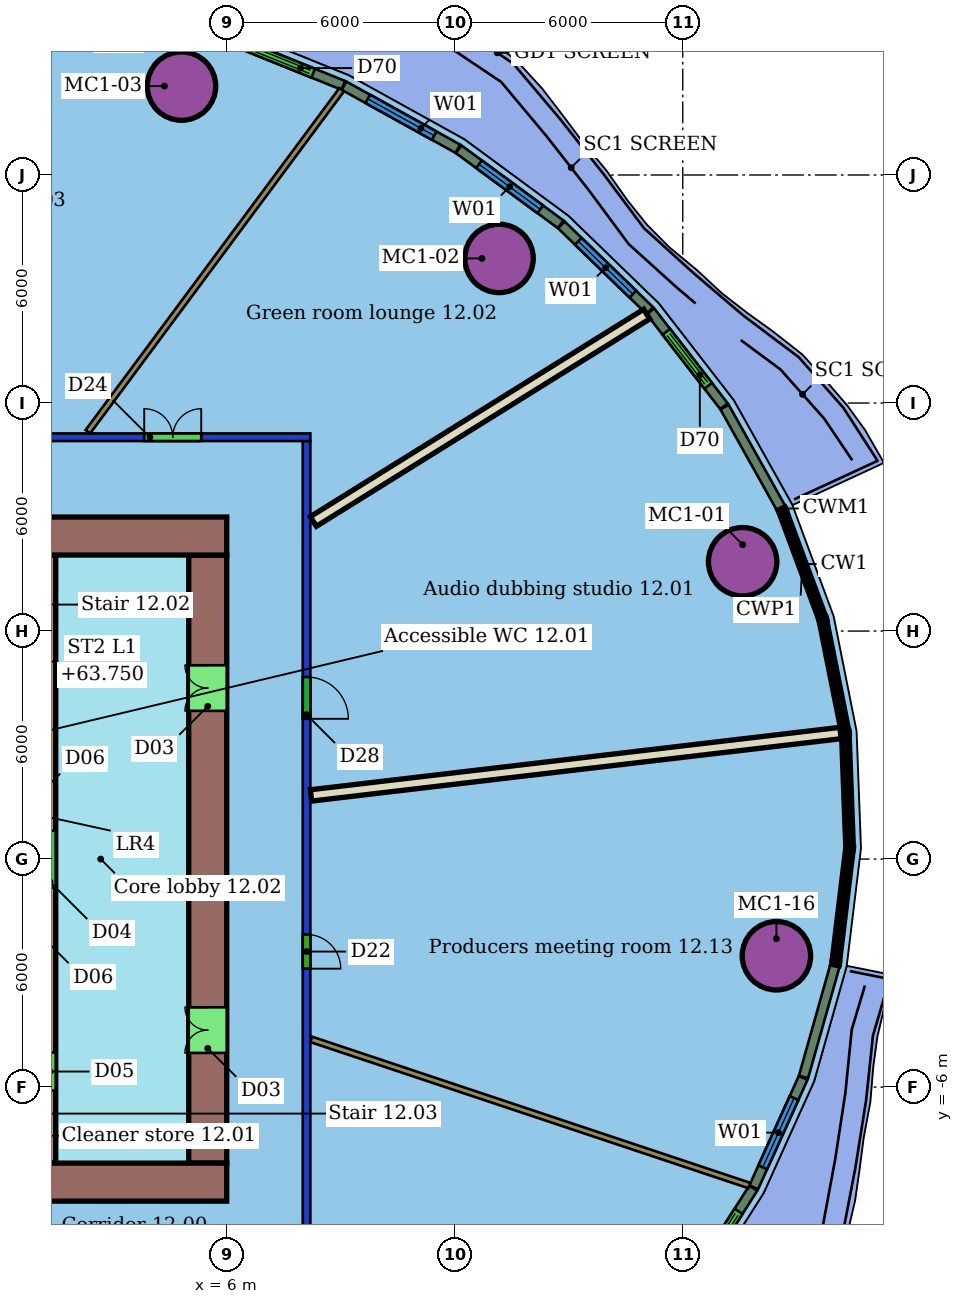
"""IFC4 building model, lengths in metres.
Left out: names, types, materials, properties, quantities, classifications, styles, units other than length and angle.
Written with IfcOpenShell. Run it as: python <this file> out.ifc"""

import sys

from ifc_helpers import new_model, si_unit, direction, frame, frame_2d, origin, origin_2d, place, context, subcontext, project, spatial, rectangle, hollow_circle, extrude, element, fill, save


model = new_model("IFC4")
c1 = context("Model", 3, precision=1e-05, world=origin(), true_north=direction((0.0, 1.0)))
c2 = subcontext(c1, "Body", "Model", "MODEL_VIEW")
j1 = project(units=[si_unit("LENGTHUNIT", "METRE"), si_unit("PLANEANGLEUNIT", "RADIAN")], contexts=[c1])
p1 = place(None, origin())
s1 = spatial("IfcSite", under=j1, at=p1, CompositionType="ELEMENT")
p2 = place(p1, origin())
s2 = spatial("IfcBuilding", under=s1, at=p2, CompositionType="ELEMENT")
p3 = place(p2, frame((0.0, 0.0, 61.9)))
s3 = spatial("IfcBuildingStorey", under=s2, at=p3, CompositionType="ELEMENT", Elevation=61.9)
for number, where, z_axis, x_axis in (
    (1, (19.575, 7.824, 0.0), (0.0, 0.0, 1.0), (1.0, 0.0, 0.0)),
    (2, (13.166, 15.805, 0.0), (0.0, 0.0, 1.0), (1.0, 0.0, 0.0)),
    (3, (4.81, 20.339, 0.0), (0.0, 0.0, 1.0), (1.0, 0.0, 0.0)),
    (4, (20.464, -2.543, 0.0), (0.0, 0.0, 1.0), (1.0, 0.0, 0.0)),
):
    element("IfcColumn", number, at=place(p3, frame(where, z_axis=z_axis, x_axis=x_axis)), inside=s3, PredefinedType="COLUMN", context=c2, shape_type="SweptSolid", body=[
        extrude(hollow_circle(Radius=0.9, WallThickness=0.06, at=origin_2d()), origin(), (0.0, 0.0, 1.0), 3.55),
    ])
p4 = place(p3, frame((-20.2, 11.1, 0.0), z_axis=(0.0, 0.0, 1.0), x_axis=(1.0, 0.0, 0.0)))
e5 = element("IfcWall", 5, at=p4, inside=s3, PredefinedType="PARTITIONING", context=c2, shape_type="SweptSolid", body=[
    extrude(rectangle(XDim=28.4, YDim=0.2, at=frame_2d((14.2, 0.0))), origin(), (0.0, 0.0, 1.0), 2.85),
])
p5 = place(p4, frame((24.029, 0.0, 0.0)))
e6 = element("IfcOpeningElement", 6, at=p5, cuts=e5, PredefinedType="OPENING", context=c2, shape_type="SweptSolid", body=[
    extrude(rectangle(XDim=1.5, YDim=2.1, at=frame_2d((0.75, 1.05))), frame((0.0, 0.11, 0.0), z_axis=(0.0, -1.0, 0.0), x_axis=(1.0, 0.0, 0.0)), (0.0, 0.0, 1.0), 0.22),
])
p6 = place(p4, frame((18.723, 0.0, 0.0)))
e7 = element("IfcOpeningElement", 7, at=p6, cuts=e5, PredefinedType="OPENING", context=c2, shape_type="SweptSolid", body=[
    extrude(rectangle(XDim=1.0, YDim=2.1, at=frame_2d((0.5, 1.05))), frame((0.0, 0.11, 0.0), z_axis=(0.0, -1.0, 0.0), x_axis=(1.0, 0.0, 0.0)), (0.0, 0.0, 1.0), 0.22),
])
p7 = place(p4, frame((10.0, 0.0, 0.0)))
e8 = element("IfcOpeningElement", 8, at=p7, cuts=e5, PredefinedType="OPENING", context=c2, shape_type="SweptSolid", body=[
    extrude(rectangle(XDim=1.2, YDim=2.1, at=frame_2d((0.6, 1.05))), frame((0.0, 0.11, 0.0), z_axis=(0.0, -1.0, 0.0), x_axis=(1.0, 0.0, 0.0)), (0.0, 0.0, 1.0), 0.22),
])
p8 = place(p4, frame((5.648, 0.0, 0.0)))
e9 = element("IfcOpeningElement", 9, at=p8, cuts=e5, PredefinedType="OPENING", context=c2, shape_type="SweptSolid", body=[
    extrude(rectangle(XDim=1.0, YDim=2.1, at=frame_2d((0.5, 1.05))), frame((0.0, 0.11, 0.0), z_axis=(0.0, -1.0, 0.0), x_axis=(1.0, 0.0, 0.0)), (0.0, 0.0, 1.0), 0.22),
])
p9 = place(p3, frame((8.1, 11.0, 0.0), z_axis=(0.0, 0.0, 1.0), x_axis=(0.0, -1.0, 0.0)))
e10 = element("IfcWall", 10, at=p9, inside=s3, PredefinedType="PARTITIONING", context=c2, shape_type="SweptSolid", body=[
    extrude(rectangle(XDim=22.0, YDim=0.2, at=frame_2d((11.0, 0.0))), origin(), (0.0, 0.0, 1.0), 2.85),
])
p10 = place(p9, frame((6.209, 0.0, 0.0)))
e11 = element("IfcOpeningElement", 11, at=p10, cuts=e10, PredefinedType="OPENING", context=c2, shape_type="SweptSolid", body=[
    extrude(rectangle(XDim=1.1, YDim=2.1, at=frame_2d((0.55, 1.05))), frame((0.0, 0.11, 0.0), z_axis=(0.0, -1.0, 0.0), x_axis=(1.0, 0.0, 0.0)), (0.0, 0.0, 1.0), 0.22),
])
p11 = place(p9, frame((12.983, 0.0, 0.0)))
e12 = element("IfcOpeningElement", 12, at=p11, cuts=e10, PredefinedType="OPENING", context=c2, shape_type="SweptSolid", body=[
    extrude(rectangle(XDim=0.9, YDim=2.1, at=frame_2d((0.45, 1.05))), frame((0.0, 0.11, 0.0), z_axis=(0.0, -1.0, 0.0), x_axis=(1.0, 0.0, 0.0)), (0.0, 0.0, 1.0), 0.22),
])
p12 = place(p3, frame((22.152, 3.317, 0.0), z_axis=(0.0, 0.0, 1.0), x_axis=(-0.993129803106, -0.117017922486, 0.0)))
e13 = element("IfcWall", 13, at=p12, inside=s3, PredefinedType="PARTITIONING", context=c2, shape_type="SweptSolid", body=[
    extrude(rectangle(XDim=14.031, YDim=0.3, at=frame_2d((7.015, 0.0))), origin(), (0.0, 0.0, 1.0), 3.55),
])
p13 = place(p3, frame((17.05, 14.339, 0.0), z_axis=(0.0, 0.0, 1.0), x_axis=(-0.849102541968, -0.528228050395, 0.0)))
e14 = element("IfcWall", 14, at=p13, inside=s3, PredefinedType="PARTITIONING", context=c2, shape_type="SweptSolid", body=[
    extrude(rectangle(XDim=10.329, YDim=0.3, at=frame_2d((5.165, 0.0))), origin(), (0.0, 0.0, 1.0), 3.55),
])
p14 = place(p3, frame((9.023, 20.242, 0.0), z_axis=(0.0, 0.0, 1.0), x_axis=(-0.595979742746, -0.802999468391, 0.0)))
e15 = element("IfcWall", 15, at=p14, inside=s3, PredefinedType="PARTITIONING", context=c2, shape_type="SweptSolid", body=[
    extrude(rectangle(XDim=11.205, YDim=0.15, at=frame_2d((5.602, 0.0))), origin(), (0.0, 0.0, 1.0), 3.55),
])
p15 = place(p3, frame((19.752, -8.589, 0.0), z_axis=(0.0, 0.0, 1.0), x_axis=(-0.948621001224, 0.316414595169, 0.0)))
e16 = element("IfcWall", 16, at=p15, inside=s3, PredefinedType="PARTITIONING", context=c2, shape_type="SweptSolid", body=[
    extrude(rectangle(XDim=12.152, YDim=0.15, at=frame_2d((6.076, 0.0))), origin(), (0.0, 0.0, 1.0), 3.55),
])
p16 = place(p3, frame((20.587, 9.234, 0.0), z_axis=(0.0, 0.0, 1.0), x_axis=(-0.488205617754, 0.872728637547, 0.0)))
e17 = element("IfcWall", 17, at=p16, inside=s3, PredefinedType="SOLIDWALL", context=c2, shape_type="SweptSolid", body=[
    extrude(rectangle(XDim=3.047, YDim=0.25, at=frame_2d((1.523, 0.0))), origin(), (0.0, 0.0, 1.0), 3.15),
])
p17 = place(p3, frame((19.085, 11.916, 0.0), z_axis=(0.0, 0.0, 1.0), x_axis=(-0.612382091745, 0.790561935404, 0.0)))
e18 = element("IfcWall", 18, at=p17, inside=s3, PredefinedType="SOLIDWALL", context=c2, shape_type="SweptSolid", body=[
    extrude(rectangle(XDim=3.158, YDim=0.25, at=frame_2d((1.579, 0.0))), origin(), (0.0, 0.0, 1.0), 3.15),
])
p18 = place(p17, frame((0.679, 0.0, 0.0)))
e19 = element("IfcOpeningElement", 19, at=p18, cuts=e18, PredefinedType="OPENING", context=c2, shape_type="SweptSolid", body=[
    extrude(rectangle(XDim=1.8, YDim=2.4, at=frame_2d((0.9, 1.2))), frame((0.0, 0.135, 0.0), z_axis=(0.0, -1.0, 0.0), x_axis=(1.0, 0.0, 0.0)), (0.0, 0.0, 1.0), 0.27),
])
p19 = place(p3, frame((17.134, 14.432, 0.0), z_axis=(0.0, 0.0, 1.0), x_axis=(-0.718313139299, 0.695719939279, 0.0)))
e20 = element("IfcWall", 20, at=p19, inside=s3, PredefinedType="SOLIDWALL", context=c2, shape_type="SweptSolid", body=[
    extrude(rectangle(XDim=3.242, YDim=0.25, at=frame_2d((1.621, 0.0))), origin(), (0.0, 0.0, 1.0), 3.15),
])
p20 = place(p19, frame((0.621, 0.0, 0.8)))
e21 = element("IfcOpeningElement", 21, at=p20, cuts=e20, PredefinedType="OPENING", context=c2, shape_type="SweptSolid", body=[
    extrude(rectangle(XDim=2.0, YDim=2.2, at=frame_2d((1.0, 1.1))), frame((0.0, 0.135, 0.0), z_axis=(0.0, -1.0, 0.0), x_axis=(1.0, 0.0, 0.0)), (0.0, 0.0, 1.0), 0.27),
])
p21 = place(p3, frame((14.786, 16.703, 0.0), z_axis=(0.0, 0.0, 1.0), x_axis=(-0.80553067299, 0.592554077594, 0.0)))
e22 = element("IfcWall", 22, at=p21, inside=s3, PredefinedType="SOLIDWALL", context=c2, shape_type="SweptSolid", body=[
    extrude(rectangle(XDim=3.332, YDim=0.25, at=frame_2d((1.666, 0.0))), origin(), (0.0, 0.0, 1.0), 3.15),
])
p22 = place(p21, frame((0.666, 0.0, 0.8)))
e23 = element("IfcOpeningElement", 23, at=p22, cuts=e22, PredefinedType="OPENING", context=c2, shape_type="SweptSolid", body=[
    extrude(rectangle(XDim=2.0, YDim=2.2, at=frame_2d((1.0, 1.1))), frame((0.0, 0.135, 0.0), z_axis=(0.0, -1.0, 0.0), x_axis=(1.0, 0.0, 0.0)), (0.0, 0.0, 1.0), 0.27),
])
p23 = place(p3, frame((12.082, 18.691, 0.0), z_axis=(0.0, 0.0, 1.0), x_axis=(-0.874758800171, 0.48455860484, 0.0)))
e24 = element("IfcWall", 24, at=p23, inside=s3, PredefinedType="SOLIDWALL", context=c2, shape_type="SweptSolid", body=[
    extrude(rectangle(XDim=3.423, YDim=0.25, at=frame_2d((1.711, 0.0))), origin(), (0.0, 0.0, 1.0), 3.15),
])
p24 = place(p23, frame((0.712, 0.0, 0.8)))
e25 = element("IfcOpeningElement", 25, at=p24, cuts=e24, PredefinedType="OPENING", context=c2, shape_type="SweptSolid", body=[
    extrude(rectangle(XDim=2.0, YDim=2.2, at=frame_2d((1.0, 1.1))), frame((0.0, 0.135, 0.0), z_axis=(0.0, -1.0, 0.0), x_axis=(1.0, 0.0, 0.0)), (0.0, 0.0, 1.0), 0.27),
])
p25 = place(p3, frame((9.066, 20.359, 0.0), z_axis=(0.0, 0.0, 1.0), x_axis=(-0.927325439412, 0.374255967782, 0.0)))
e26 = element("IfcWall", 26, at=p25, inside=s3, PredefinedType="SOLIDWALL", context=c2, shape_type="SweptSolid", body=[
    extrude(rectangle(XDim=3.509, YDim=0.25, at=frame_2d((1.754, 0.0))), origin(), (0.0, 0.0, 1.0), 3.15),
])
p26 = place(p25, frame((0.854, 0.0, 0.0)))
e27 = element("IfcOpeningElement", 27, at=p26, cuts=e26, PredefinedType="OPENING", context=c2, shape_type="SweptSolid", body=[
    extrude(rectangle(XDim=1.8, YDim=2.4, at=frame_2d((0.9, 1.2))), frame((0.0, 0.135, 0.0), z_axis=(0.0, -1.0, 0.0), x_axis=(1.0, 0.0, 0.0)), (0.0, 0.0, 1.0), 0.27),
])
p27 = place(p3, frame((18.114, -11.395, 0.0), z_axis=(0.0, 0.0, 1.0), x_axis=(0.536899857644, 0.843645981951, 0.0)))
e28 = element("IfcWall", 28, at=p27, inside=s3, PredefinedType="SOLIDWALL", context=c2, shape_type="SweptSolid", body=[
    extrude(rectangle(XDim=3.242, YDim=0.25, at=frame_2d((1.621, 0.0))), origin(), (0.0, 0.0, 1.0), 3.15),
])
p28 = place(p27, frame((0.721, 0.0, 0.0)))
e29 = element("IfcOpeningElement", 29, at=p28, cuts=e28, PredefinedType="OPENING", context=c2, shape_type="SweptSolid", body=[
    extrude(rectangle(XDim=1.8, YDim=2.4, at=frame_2d((0.9, 1.2))), frame((0.0, 0.135, 0.0), z_axis=(0.0, -1.0, 0.0), x_axis=(1.0, 0.0, 0.0)), (0.0, 0.0, 1.0), 0.27),
])
p29 = place(p3, frame((19.867, -8.637, 0.0), z_axis=(0.0, 0.0, 1.0), x_axis=(0.411804193901, 0.911272355493, 0.0)))
e30 = element("IfcWall", 30, at=p29, inside=s3, PredefinedType="SOLIDWALL", context=c2, shape_type="SweptSolid", body=[
    extrude(rectangle(XDim=3.158, YDim=0.25, at=frame_2d((1.579, 0.0))), origin(), (0.0, 0.0, 1.0), 3.15),
])
p30 = place(p29, frame((0.579, 0.0, 0.8)))
e31 = element("IfcOpeningElement", 31, at=p30, cuts=e30, PredefinedType="OPENING", context=c2, shape_type="SweptSolid", body=[
    extrude(rectangle(XDim=2.0, YDim=2.2, at=frame_2d((1.0, 1.1))), frame((0.0, 0.135, 0.0), z_axis=(0.0, -1.0, 0.0), x_axis=(1.0, 0.0, 0.0)), (0.0, 0.0, 1.0), 0.27),
])
p31 = place(p3, frame((21.177, -5.734, 0.0), z_axis=(0.0, 0.0, 1.0), x_axis=(0.27192635973, 0.962318063264, 0.0)))
e32 = element("IfcWall", 32, at=p31, inside=s3, PredefinedType="SOLIDWALL", context=c2, shape_type="SweptSolid", body=[
    extrude(rectangle(XDim=3.047, YDim=0.25, at=frame_2d((1.523, 0.0))), origin(), (0.0, 0.0, 1.0), 3.15),
])
p32 = place(p3, frame((6.0, 8.5, 0.0), z_axis=(0.0, 0.0, 1.0), x_axis=(-1.0, 0.0, 0.0)))
e33 = element("IfcWall", 33, at=p32, inside=s3, PredefinedType="SHEAR", context=c2, shape_type="SweptSolid", body=[
    extrude(rectangle(XDim=12.0, YDim=1.0, at=frame_2d((6.0, 0.0))), origin(), (0.0, 0.0, 1.0), 3.4),
])
p33 = place(p32, frame((5.6, 0.0, 0.0)))
e34 = element("IfcOpeningElement", 34, at=p33, cuts=e33, PredefinedType="OPENING", context=c2, shape_type="SweptSolid", body=[
    extrude(rectangle(XDim=1.2, YDim=2.1, at=frame_2d((0.6, 1.05))), frame((0.0, 0.51, 0.0), z_axis=(0.0, -1.0, 0.0), x_axis=(1.0, 0.0, 0.0)), (0.0, 0.0, 1.0), 1.02),
])
p34 = place(p3, frame((-18.0, -8.5, 0.0), z_axis=(0.0, 0.0, 1.0), x_axis=(1.0, 0.0, 0.0)))
e35 = element("IfcWall", 35, at=p34, inside=s3, PredefinedType="SHEAR", context=c2, shape_type="SweptSolid", body=[
    extrude(rectangle(XDim=24.0, YDim=1.0, at=frame_2d((12.0, 0.0))), origin(), (0.0, 0.0, 1.0), 3.4),
])
p35 = place(p34, frame((6.0, 0.0, 0.0)))
e36 = element("IfcOpeningElement", 36, at=p35, cuts=e35, PredefinedType="OPENING", context=c2, shape_type="SweptSolid", body=[
    extrude(rectangle(XDim=1.2, YDim=2.1, at=frame_2d((0.6, 1.05))), frame((0.0, 0.51, 0.0), z_axis=(0.0, -1.0, 0.0), x_axis=(1.0, 0.0, 0.0)), (0.0, 0.0, 1.0), 1.02),
])
p36 = place(p3, frame((5.5, -8.0, 0.0), z_axis=(0.0, 0.0, 1.0), x_axis=(0.0, 1.0, 0.0)))
e37 = element("IfcWall", 37, at=p36, inside=s3, PredefinedType="SHEAR", context=c2, shape_type="SweptSolid", body=[
    extrude(rectangle(XDim=16.0, YDim=1.0, at=frame_2d((8.0, 0.0))), origin(), (0.0, 0.0, 1.0), 3.4),
])
p37 = place(p36, frame((2.9, 0.0, 0.0)))
e38 = element("IfcOpeningElement", 38, at=p37, cuts=e37, PredefinedType="OPENING", context=c2, shape_type="SweptSolid", body=[
    extrude(rectangle(XDim=1.2, YDim=2.1, at=frame_2d((0.6, 1.05))), frame((0.0, 0.51, 0.0), z_axis=(0.0, -1.0, 0.0), x_axis=(1.0, 0.0, 0.0)), (0.0, 0.0, 1.0), 1.02),
])
p38 = place(p36, frame((11.9, 0.0, 0.0)))
e39 = element("IfcOpeningElement", 39, at=p38, cuts=e37, PredefinedType="OPENING", context=c2, shape_type="SweptSolid", body=[
    extrude(rectangle(XDim=1.2, YDim=2.1, at=frame_2d((0.6, 1.05))), frame((0.0, 0.51, 0.0), z_axis=(0.0, -1.0, 0.0), x_axis=(1.0, 0.0, 0.0)), (0.0, 0.0, 1.0), 1.02),
])
p39 = place(p3, frame((1.35, -8.0, 0.0), z_axis=(0.0, 0.0, 1.0), x_axis=(0.0, 1.0, 0.0)))
e40 = element("IfcWall", 40, at=p39, inside=s3, PredefinedType="SHEAR", context=c2, shape_type="SweptSolid", body=[
    extrude(rectangle(XDim=16.0, YDim=0.3, at=frame_2d((8.0, 0.0))), origin(), (0.0, 0.0, 1.0), 3.4),
])
p40 = place(p39, frame((1.91, 0.0, 0.0)))
e41 = element("IfcOpeningElement", 41, at=p40, cuts=e40, PredefinedType="OPENING", context=c2, shape_type="SweptSolid", body=[
    extrude(rectangle(XDim=1.0, YDim=2.1, at=frame_2d((0.5, 1.05))), frame((0.0, 0.16, 0.0), z_axis=(0.0, -1.0, 0.0), x_axis=(1.0, 0.0, 0.0)), (0.0, 0.0, 1.0), 0.32),
])
p41 = place(p39, frame((7.25, 0.0, 0.0)))
e42 = element("IfcOpeningElement", 42, at=p41, cuts=e40, PredefinedType="OPENING", context=c2, shape_type="SweptSolid", body=[
    extrude(rectangle(XDim=1.5, YDim=2.1, at=frame_2d((0.75, 1.05))), frame((0.0, 0.16, 0.0), z_axis=(0.0, -1.0, 0.0), x_axis=(1.0, 0.0, 0.0)), (0.0, 0.0, 1.0), 0.32),
])
p42 = place(p10, origin())
e43 = element("IfcDoor", 43, at=p42, inside=s3, OperationType="SINGLE_SWING_RIGHT", PredefinedType="DOOR", context=c2, shape_type="SweptSolid", body=[
    extrude(rectangle(XDim=1.1, YDim=2.1, at=frame_2d((0.55, 1.05))), frame((0.0, 0.025, 0.0), z_axis=(0.0, -1.0, 0.0), x_axis=(1.0, 0.0, 0.0)), (0.0, 0.0, 1.0), 0.05),
])
fill(e11, e43)
p43 = place(p5, origin())
e44 = element("IfcDoor", 44, at=p43, inside=s3, OperationType="DOUBLE_DOOR_SINGLE_SWING", PredefinedType="DOOR", context=c2, shape_type="SweptSolid", body=[
    extrude(rectangle(XDim=1.5, YDim=2.1, at=frame_2d((0.75, 1.05))), frame((0.0, 0.025, 0.0), z_axis=(0.0, -1.0, 0.0), x_axis=(1.0, 0.0, 0.0)), (0.0, 0.0, 1.0), 0.05),
])
fill(e6, e44)
p44 = place(p11, origin())
e45 = element("IfcDoor", 45, at=p44, inside=s3, OperationType="SINGLE_SWING_RIGHT", PredefinedType="DOOR", context=c2, shape_type="SweptSolid", body=[
    extrude(rectangle(XDim=0.9, YDim=2.1, at=frame_2d((0.45, 1.05))), frame((0.0, 0.025, 0.0), z_axis=(0.0, -1.0, 0.0), x_axis=(1.0, 0.0, 0.0)), (0.0, 0.0, 1.0), 0.05),
])
fill(e12, e45)
p45 = place(p18, origin())
e46 = element("IfcDoor", 46, at=p45, inside=s3, OperationType="DOUBLE_DOOR_SLIDING", PredefinedType="DOOR", context=c2, shape_type="SweptSolid", body=[
    extrude(rectangle(XDim=1.8, YDim=2.4, at=frame_2d((0.9, 1.2))), frame((0.0, 0.025, 0.0), z_axis=(0.0, -1.0, 0.0), x_axis=(1.0, 0.0, 0.0)), (0.0, 0.0, 1.0), 0.05),
])
fill(e19, e46)
p46 = place(p20, origin())
e47 = element("IfcWindow", 47, at=p46, inside=s3, PartitioningType="SINGLE_PANEL", PredefinedType="WINDOW", context=c2, shape_type="SweptSolid", body=[
    extrude(rectangle(XDim=2.0, YDim=2.2, at=frame_2d((1.0, 1.1))), frame((0.0, 0.03, 0.0), z_axis=(0.0, -1.0, 0.0), x_axis=(1.0, 0.0, 0.0)), (0.0, 0.0, 1.0), 0.06),
])
fill(e21, e47)
p47 = place(p22, origin())
e48 = element("IfcWindow", 48, at=p47, inside=s3, PartitioningType="SINGLE_PANEL", PredefinedType="WINDOW", context=c2, shape_type="SweptSolid", body=[
    extrude(rectangle(XDim=2.0, YDim=2.2, at=frame_2d((1.0, 1.1))), frame((0.0, 0.03, 0.0), z_axis=(0.0, -1.0, 0.0), x_axis=(1.0, 0.0, 0.0)), (0.0, 0.0, 1.0), 0.06),
])
fill(e23, e48)
p48 = place(p24, origin())
e49 = element("IfcWindow", 49, at=p48, inside=s3, PartitioningType="SINGLE_PANEL", PredefinedType="WINDOW", context=c2, shape_type="SweptSolid", body=[
    extrude(rectangle(XDim=2.0, YDim=2.2, at=frame_2d((1.0, 1.1))), frame((0.0, 0.03, 0.0), z_axis=(0.0, -1.0, 0.0), x_axis=(1.0, 0.0, 0.0)), (0.0, 0.0, 1.0), 0.06),
])
fill(e25, e49)
p49 = place(p26, origin())
e50 = element("IfcDoor", 50, at=p49, inside=s3, OperationType="DOUBLE_DOOR_SLIDING", PredefinedType="DOOR", context=c2, shape_type="SweptSolid", body=[
    extrude(rectangle(XDim=1.8, YDim=2.4, at=frame_2d((0.9, 1.2))), frame((0.0, 0.025, 0.0), z_axis=(0.0, -1.0, 0.0), x_axis=(1.0, 0.0, 0.0)), (0.0, 0.0, 1.0), 0.05),
])
fill(e27, e50)
p50 = place(p28, origin())
e51 = element("IfcDoor", 51, at=p50, inside=s3, OperationType="DOUBLE_DOOR_SLIDING", PredefinedType="DOOR", context=c2, shape_type="SweptSolid", body=[
    extrude(rectangle(XDim=1.8, YDim=2.4, at=frame_2d((0.9, 1.2))), frame((0.0, 0.025, 0.0), z_axis=(0.0, -1.0, 0.0), x_axis=(1.0, 0.0, 0.0)), (0.0, 0.0, 1.0), 0.05),
])
fill(e29, e51)
p51 = place(p30, origin())
e52 = element("IfcWindow", 52, at=p51, inside=s3, PartitioningType="SINGLE_PANEL", PredefinedType="WINDOW", context=c2, shape_type="SweptSolid", body=[
    extrude(rectangle(XDim=2.0, YDim=2.2, at=frame_2d((1.0, 1.1))), frame((0.0, 0.03, 0.0), z_axis=(0.0, -1.0, 0.0), x_axis=(1.0, 0.0, 0.0)), (0.0, 0.0, 1.0), 0.06),
])
fill(e31, e52)
p52 = place(p37, origin())
e53 = element("IfcDoor", 53, at=p52, inside=s3, OperationType="DOUBLE_DOOR_SINGLE_SWING", PredefinedType="NOTDEFINED", context=c2, shape_type="SweptSolid", body=[
    extrude(rectangle(XDim=1.2, YDim=2.1, at=frame_2d((0.6, 1.05))), frame((0.0, 0.025, 0.0), z_axis=(0.0, -1.0, 0.0), x_axis=(1.0, 0.0, 0.0)), (0.0, 0.0, 1.0), 0.05),
])
fill(e38, e53)
p53 = place(p38, origin())
e54 = element("IfcDoor", 54, at=p53, inside=s3, OperationType="DOUBLE_DOOR_SINGLE_SWING", PredefinedType="NOTDEFINED", context=c2, shape_type="SweptSolid", body=[
    extrude(rectangle(XDim=1.2, YDim=2.1, at=frame_2d((0.6, 1.05))), frame((0.0, 0.025, 0.0), z_axis=(0.0, -1.0, 0.0), x_axis=(1.0, 0.0, 0.0)), (0.0, 0.0, 1.0), 0.05),
])
fill(e39, e54)
save(model, sys.argv[1])
